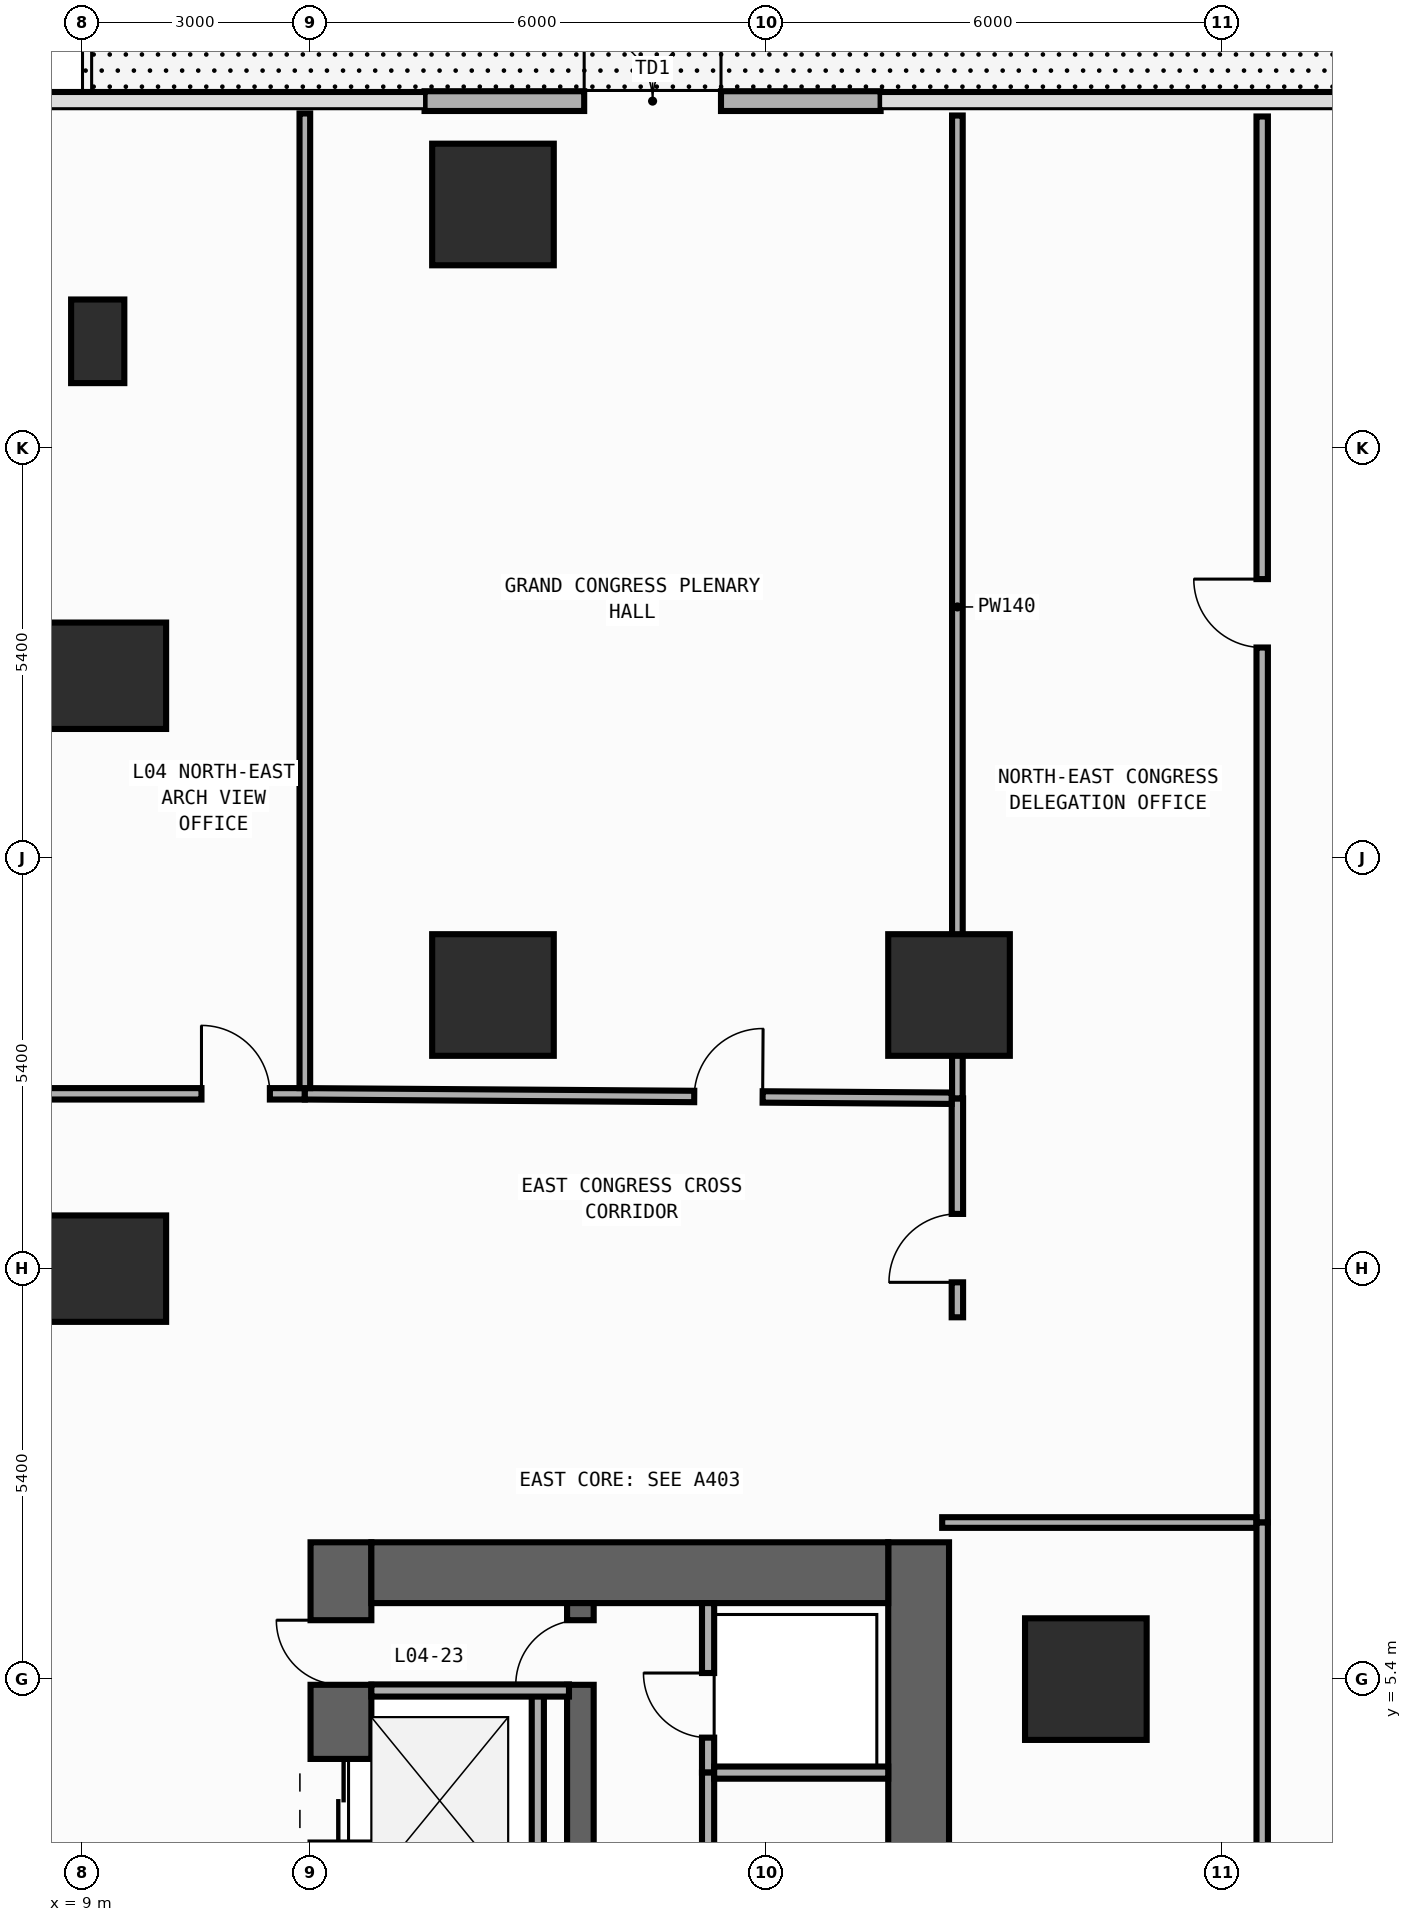
"""IFC4 building model, lengths in metres.
Left out: names, types, materials, properties, quantities, classifications, styles, units other than length and angle.
Written with IfcOpenShell. Run it as: python <this file> out.ifc"""

import sys

from ifc_helpers import new_model, si_unit, direction, frame, frame_2d, origin, origin_2d, place, context, subcontext, project, spatial, rectangle, extrude, element, fill, save


model = new_model("IFC4")
c1 = context("Model", 3, precision=1e-05, world=origin(), true_north=direction((0.0, 1.0)))
c2 = subcontext(c1, "Body", "Model", "MODEL_VIEW")
j1 = project(units=[si_unit("LENGTHUNIT", "METRE"), si_unit("PLANEANGLEUNIT", "RADIAN")], contexts=[c1])
p1 = place(None, origin())
s1 = spatial("IfcSite", under=j1, at=p1, CompositionType="ELEMENT")
p2 = place(p1, origin())
s2 = spatial("IfcBuilding", under=s1, at=p2, CompositionType="ELEMENT")
p3 = place(p2, frame((0.0, 0.0, 16.0)))
s3 = spatial("IfcBuildingStorey", under=s2, at=p3, CompositionType="ELEMENT", Elevation=16.0)
p4 = place(p3, frame((12.4, -19.8, 0.0), z_axis=(0.0, 0.0, 1.0), x_axis=(0.0, 1.0, 0.0)))
e1 = element("IfcWall", 1, at=p4, inside=s3, PredefinedType="SHEAR", context=c2, shape_type="SweptSolid", body=[
    extrude(rectangle(XDim=27.0, YDim=0.8, at=frame_2d((13.5, 0.0))), origin(), (0.0, 0.0, 1.0), 4.55),
])
p5 = place(p4, frame((23.05, 0.0, 0.0)))
e2 = element("IfcOpeningElement", 2, at=p5, cuts=e1, PredefinedType="OPENING", context=c2, shape_type="SweptSolid", body=[
    extrude(rectangle(XDim=1.1, YDim=2.2, at=frame_2d((0.55, 1.1))), frame((0.0, 0.41, 0.0), z_axis=(0.0, -1.0, 0.0), x_axis=(1.0, 0.0, 0.0)), (0.0, 0.0, 1.0), 0.82),
])
p6 = place(p4, frame((19.85, 0.0, 0.0)))
e3 = element("IfcOpeningElement", 3, at=p6, cuts=e1, PredefinedType="OPENING", context=c2, shape_type="SweptSolid", body=[
    extrude(rectangle(XDim=1.1, YDim=2.2, at=frame_2d((0.55, 1.1))), frame((0.0, 0.41, 0.0), z_axis=(0.0, -1.0, 0.0), x_axis=(1.0, 0.0, 0.0)), (0.0, 0.0, 1.0), 0.82),
])
p7 = place(p4, frame((16.65, 0.0, 0.0)))
e4 = element("IfcOpeningElement", 4, at=p7, cuts=e1, PredefinedType="OPENING", context=c2, shape_type="SweptSolid", body=[
    extrude(rectangle(XDim=1.1, YDim=2.2, at=frame_2d((0.55, 1.1))), frame((0.0, 0.41, 0.0), z_axis=(0.0, -1.0, 0.0), x_axis=(1.0, 0.0, 0.0)), (0.0, 0.0, 1.0), 0.82),
])
p8 = place(p4, frame((7.175, 0.0, 0.0)))
e5 = element("IfcOpeningElement", 5, at=p8, cuts=e1, PredefinedType="OPENING", context=c2, shape_type="SweptSolid", body=[
    extrude(rectangle(XDim=0.85, YDim=2.1, at=frame_2d((0.425, 1.05))), frame((0.0, 0.41, 0.0), z_axis=(0.0, -1.0, 0.0), x_axis=(1.0, 0.0, 0.0)), (0.0, 0.0, 1.0), 0.82),
])
p9 = place(p4, frame((10.375, 0.0, 0.0)))
e6 = element("IfcOpeningElement", 6, at=p9, cuts=e1, PredefinedType="OPENING", context=c2, shape_type="SweptSolid", body=[
    extrude(rectangle(XDim=0.85, YDim=2.1, at=frame_2d((0.425, 1.05))), frame((0.0, 0.41, 0.0), z_axis=(0.0, -1.0, 0.0), x_axis=(1.0, 0.0, 0.0)), (0.0, 0.0, 1.0), 0.82),
])
p10 = place(p4, frame((12.725, 0.0, 0.0)))
e7 = element("IfcOpeningElement", 7, at=p10, cuts=e1, PredefinedType="OPENING", context=c2, shape_type="SweptSolid", body=[
    extrude(rectangle(XDim=1.15, YDim=2.2, at=frame_2d((0.575, 1.1))), frame((0.0, 0.41, 0.0), z_axis=(0.0, -1.0, 0.0), x_axis=(1.0, 0.0, 0.0)), (0.0, 0.0, 1.0), 0.82),
])
p11 = place(p4, frame((25.125, 0.0, 0.0)))
e8 = element("IfcOpeningElement", 8, at=p11, cuts=e1, PredefinedType="OPENING", context=c2, shape_type="SweptSolid", body=[
    extrude(rectangle(XDim=0.85, YDim=2.1, at=frame_2d((0.425, 1.05))), frame((0.0, 0.41, 0.0), z_axis=(0.0, -1.0, 0.0), x_axis=(1.0, 0.0, 0.0)), (0.0, 0.0, 1.0), 0.82),
])
p12 = place(p3, frame((20.0, -19.8, 0.0), z_axis=(0.0, 0.0, 1.0), x_axis=(0.0, 1.0, 0.0)))
e9 = element("IfcWall", 9, at=p12, inside=s3, PredefinedType="SHEAR", context=c2, shape_type="SweptSolid", body=[
    extrude(rectangle(XDim=27.0, YDim=0.8, at=frame_2d((13.5, 0.0))), origin(), (0.0, 0.0, 1.0), 4.55),
])
p13 = place(p3, frame((12.8, 6.8, 0.0), z_axis=(0.0, 0.0, 1.0), x_axis=(1.0, 0.0, 0.0)))
e10 = element("IfcWall", 10, at=p13, inside=s3, PredefinedType="SHEAR", context=c2, shape_type="SweptSolid", body=[
    extrude(rectangle(XDim=6.8, YDim=0.8, at=frame_2d((3.4, 0.0))), origin(), (0.0, 0.0, 1.0), 4.55),
])
p14 = place(p3, frame((15.55, -19.0, 0.0), z_axis=(0.0, 0.0, 1.0), x_axis=(0.0, 1.0, 0.0)))
e11 = element("IfcWall", 11, at=p14, inside=s3, PredefinedType="SHEAR", context=c2, shape_type="SweptSolid", body=[
    extrude(rectangle(XDim=25.4, YDim=0.35, at=frame_2d((12.7, 0.0))), origin(), (0.0, 0.0, 1.0), 4.55),
])
p15 = place(p14, frame((11.925, 0.0, 0.0)))
e12 = element("IfcOpeningElement", 12, at=p15, cuts=e11, PredefinedType="OPENING", context=c2, shape_type="SweptSolid", body=[
    extrude(rectangle(XDim=1.15, YDim=2.2, at=frame_2d((0.575, 1.1))), frame((0.0, 0.185, 0.0), z_axis=(0.0, -1.0, 0.0), x_axis=(1.0, 0.0, 0.0)), (0.0, 0.0, 1.0), 0.37),
])
p16 = place(p14, frame((24.325, 0.0, 0.0)))
e13 = element("IfcOpeningElement", 13, at=p16, cuts=e11, PredefinedType="OPENING", context=c2, shape_type="SweptSolid", body=[
    extrude(rectangle(XDim=0.85, YDim=2.1, at=frame_2d((0.425, 1.05))), frame((0.0, 0.185, 0.0), z_axis=(0.0, -1.0, 0.0), x_axis=(1.0, 0.0, 0.0)), (0.0, 0.0, 1.0), 0.37),
])
for number, where, z_axis, x_axis in (
    (14, (9.2, 10.8, 0.0), (0.0, 0.0, 1.0), (1.0, 0.0, 0.0)),
    (15, (9.2, 18.6, 0.0), (0.0, 0.0, 1.0), (1.0, 0.0, 0.0)),
):
    element("IfcColumn", number, at=place(p3, frame(where, z_axis=z_axis, x_axis=x_axis)), inside=s3, PredefinedType="COLUMN", context=c2, shape_type="SweptSolid", body=[
        extrude(rectangle(XDim=1.8, YDim=1.4, at=origin_2d()), origin(), (0.0, 0.0, 1.0), 5.0),
    ])
for number, where, z_axis, x_axis in (
    (16, (20.4, 14.4, 0.0), (0.0, 0.0, 1.0), (1.0, 0.0, 0.0)),
    (17, (14.4, 14.4, 0.0), (0.0, 0.0, 1.0), (1.0, 0.0, 0.0)),
    (18, (22.2, 5.4, 0.0), (0.0, 0.0, 1.0), (1.0, 0.0, 0.0)),
    (19, (14.4, 24.8, 0.0), (0.0, 0.0, 1.0), (1.0, 0.0, 0.0)),
):
    element("IfcColumn", number, at=place(p3, frame(where, z_axis=z_axis, x_axis=x_axis)), inside=s3, PredefinedType="COLUMN", context=c2, shape_type="SweptSolid", body=[
        extrude(rectangle(XDim=1.6, YDim=1.6, at=origin_2d()), origin(), (0.0, 0.0, 1.0), 5.0),
    ])
p17 = place(p3, frame((9.2, 23.0, 0.0), z_axis=(0.0, 0.0, 1.0), x_axis=(1.0, 0.0, 0.0)))
e20 = element("IfcColumn", 20, at=p17, inside=s3, PredefinedType="PILASTER", context=c2, shape_type="SweptSolid", body=[
    extrude(rectangle(XDim=0.7, YDim=1.1, at=origin_2d()), origin(), (0.0, 0.0, 1.0), 5.0),
])
p18 = place(p3, frame((13.5, 26.16, 0.0), z_axis=(0.0, 0.0, 1.0), x_axis=(1.0, 0.0, 0.0)))
e21 = element("IfcWall", 21, at=p18, inside=s3, PredefinedType="STANDARD", context=c2, shape_type="SweptSolid", body=[
    extrude(rectangle(XDim=6.0, YDim=0.26, at=frame_2d((3.0, 0.0))), origin(), (0.0, 0.0, 1.0), 4.55),
])
p19 = place(p18, frame((2.1, 0.0, 0.0)))
e22 = element("IfcOpeningElement", 22, at=p19, cuts=e21, PredefinedType="OPENING", context=c2, shape_type="SweptSolid", body=[
    extrude(rectangle(XDim=1.8, YDim=2.3, at=frame_2d((0.9, 1.15))), frame((0.0, 0.14, 0.0), z_axis=(0.0, -1.0, 0.0), x_axis=(1.0, 0.0, 0.0)), (0.0, 0.0, 1.0), 0.28),
])
p20 = place(p3, frame((14.99, 2.4, 0.0), z_axis=(0.0, 0.0, 1.0), x_axis=(0.0, 1.0, 0.0)))
e23 = element("IfcWall", 23, at=p20, inside=s3, PredefinedType="STANDARD", context=c2, shape_type="SweptSolid", body=[
    extrude(rectangle(XDim=2.8, YDim=0.16, at=frame_2d((1.4, 0.0))), origin(), (0.0, 0.0, 1.0), 4.55),
])
p21 = place(p3, frame((12.8, 5.25, 0.0), z_axis=(0.0, 0.0, 1.0), x_axis=(1.0, 0.0, 0.0)))
e24 = element("IfcWall", 24, at=p21, inside=s3, PredefinedType="STANDARD", context=c2, shape_type="SweptSolid", body=[
    extrude(rectangle(XDim=2.6, YDim=0.16, at=frame_2d((1.3, 0.0))), origin(), (0.0, 0.0, 1.0), 4.55),
])
p22 = place(p3, frame((17.23, 4.17, 0.0), z_axis=(0.0, 0.0, 1.0), x_axis=(0.0, 1.0, 0.0)))
e25 = element("IfcWall", 25, at=p22, inside=s3, PredefinedType="PARTITIONING", context=c2, shape_type="SweptSolid", body=[
    extrude(rectangle(XDim=2.23, YDim=0.16, at=frame_2d((1.115, 0.0))), origin(), (0.0, 0.0, 1.0), 4.55),
])
p23 = place(p22, frame((0.46, 0.0, 0.0)))
e26 = element("IfcOpeningElement", 26, at=p23, cuts=e25, PredefinedType="OPENING", context=c2, shape_type="SweptSolid", body=[
    extrude(rectangle(XDim=0.85, YDim=2.1, at=frame_2d((0.425, 1.05))), frame((0.0, 0.09, 0.0), z_axis=(0.0, -1.0, 0.0), x_axis=(1.0, 0.0, 0.0)), (0.0, 0.0, 1.0), 0.18),
])
p24 = place(p3, frame((17.23, 1.53, 0.0), z_axis=(0.0, 0.0, 1.0), x_axis=(0.0, 1.0, 0.0)))
e27 = element("IfcWall", 27, at=p24, inside=s3, PredefinedType="PARTITIONING", context=c2, shape_type="SweptSolid", body=[
    extrude(rectangle(XDim=2.64, YDim=0.16, at=frame_2d((1.32, 0.0))), origin(), (0.0, 0.0, 1.0), 4.55),
])
p25 = place(p24, frame((0.677, 0.0, 0.0)))
e28 = element("IfcOpeningElement", 28, at=p25, cuts=e27, PredefinedType="OPENING", context=c2, shape_type="SweptSolid", body=[
    extrude(rectangle(XDim=0.85, YDim=2.1, at=frame_2d((0.425, 1.05))), frame((0.0, 0.09, 0.0), z_axis=(0.0, -1.0, 0.0), x_axis=(1.0, 0.0, 0.0)), (0.0, 0.0, 1.0), 0.18),
])
p26 = place(p3, frame((17.31, 4.17, 0.0), z_axis=(0.0, 0.0, 1.0), x_axis=(1.0, 0.0, 0.0)))
e29 = element("IfcWall", 29, at=p26, inside=s3, PredefinedType="PARTITIONING", context=c2, shape_type="SweptSolid", body=[
    extrude(rectangle(XDim=2.29, YDim=0.16, at=frame_2d((1.145, 0.0))), origin(), (0.0, 0.0, 1.0), 4.55),
])
p27 = place(p3, frame((24.52, 7.46, 0.0), z_axis=(0.0, 0.0, 1.0), x_axis=(0.0, 1.0, 0.0)))
e30 = element("IfcWall", 30, at=p27, inside=s3, PredefinedType="PARTITIONING", context=c2, shape_type="SweptSolid", body=[
    extrude(rectangle(XDim=18.498, YDim=0.15, at=frame_2d((9.249, 0.0))), origin(), (0.0, 0.0, 1.0), 4.55),
])
p28 = place(p27, frame((11.512, 0.0, 0.0)))
e31 = element("IfcOpeningElement", 31, at=p28, cuts=e30, PredefinedType="OPENING", context=c2, shape_type="SweptSolid", body=[
    extrude(rectangle(XDim=0.9, YDim=2.15, at=frame_2d((0.45, 1.075))), frame((0.0, 0.085, 0.0), z_axis=(0.0, -1.0, 0.0), x_axis=(1.0, 0.0, 0.0)), (0.0, 0.0, 1.0), 0.17),
])
p29 = place(p3, frame((20.51, 10.16, 0.0), z_axis=(0.0, 0.0, 1.0), x_axis=(0.0, 1.0, 0.0)))
e32 = element("IfcWall", 32, at=p29, inside=s3, PredefinedType="PARTITIONING", context=c2, shape_type="SweptSolid", body=[
    extrude(rectangle(XDim=2.88, YDim=0.15, at=frame_2d((1.44, 0.0))), origin(), (0.0, 0.0, 1.0), 4.55),
])
p30 = place(p29, frame((0.46, 0.0, 0.0)))
e33 = element("IfcOpeningElement", 33, at=p30, cuts=e32, PredefinedType="OPENING", context=c2, shape_type="SweptSolid", body=[
    extrude(rectangle(XDim=0.9, YDim=2.15, at=frame_2d((0.45, 1.075))), frame((0.0, 0.085, 0.0), z_axis=(0.0, -1.0, 0.0), x_axis=(1.0, 0.0, 0.0)), (0.0, 0.0, 1.0), 0.17),
])
p31 = place(p3, frame((20.51, 13.04, 0.0), z_axis=(0.0, 0.0, 1.0), x_axis=(0.0, 1.0, 0.0)))
e34 = element("IfcWall", 34, at=p31, inside=s3, PredefinedType="PARTITIONING", context=c2, shape_type="SweptSolid", body=[
    extrude(rectangle(XDim=12.93, YDim=0.14, at=frame_2d((6.465, 0.0))), origin(), (0.0, 0.0, 1.0), 4.55),
])
p32 = place(p3, frame((20.31, 7.46, 0.0), z_axis=(0.0, 0.0, 1.0), x_axis=(1.0, 0.0, 0.0)))
e35 = element("IfcWall", 35, at=p32, inside=s3, PredefinedType="PARTITIONING", context=c2, shape_type="SweptSolid", body=[
    extrude(rectangle(XDim=4.135, YDim=0.14, at=frame_2d((2.067, 0.0))), origin(), (0.0, 0.0, 1.0), 4.55),
])
p33 = place(p3, frame((8.205, 13.1, 0.0), z_axis=(0.0, 0.0, 1.0), x_axis=(1.0, 0.0, 0.0)))
e36 = element("IfcWall", 36, at=p33, inside=s3, PredefinedType="PARTITIONING", context=c2, shape_type="SweptSolid", body=[
    extrude(rectangle(XDim=3.72, YDim=0.15, at=frame_2d((1.86, 0.0))), origin(), (0.0, 0.0, 1.0), 4.55),
])
p34 = place(p33, frame((2.36, 0.0, 0.0)))
e37 = element("IfcOpeningElement", 37, at=p34, cuts=e36, PredefinedType="OPENING", context=c2, shape_type="SweptSolid", body=[
    extrude(rectangle(XDim=0.9, YDim=2.15, at=frame_2d((0.45, 1.075))), frame((0.0, 0.085, 0.0), z_axis=(0.0, -1.0, 0.0), x_axis=(1.0, 0.0, 0.0)), (0.0, 0.0, 1.0), 0.17),
])
p35 = place(p3, frame((24.52, -16.12, 0.0), z_axis=(0.0, 0.0, 1.0), x_axis=(0.0, 1.0, 0.0)))
e38 = element("IfcWall", 38, at=p35, inside=s3, PredefinedType="PARTITIONING", context=c2, shape_type="SweptSolid", body=[
    extrude(rectangle(XDim=23.58, YDim=0.15, at=frame_2d((11.79, 0.0))), origin(), (0.0, 0.0, 1.0), 4.55),
])
p36 = place(p35, frame((10.333, 0.0, 0.0)))
e39 = element("IfcOpeningElement", 39, at=p36, cuts=e38, PredefinedType="OPENING", context=c2, shape_type="SweptSolid", body=[
    extrude(rectangle(XDim=0.9, YDim=2.15, at=frame_2d((0.45, 1.075))), frame((0.0, 0.085, 0.0), z_axis=(0.0, -1.0, 0.0), x_axis=(1.0, 0.0, 0.0)), (0.0, 0.0, 1.0), 0.17),
])
p37 = place(p3, frame((11.925, 13.1, 0.0), z_axis=(0.0, 0.0, 1.0), x_axis=(0.999976690727, -0.006827737682, 0.0)))
e40 = element("IfcWall", 40, at=p37, inside=s3, PredefinedType="PARTITIONING", context=c2, shape_type="SweptSolid", body=[
    extrude(rectangle(XDim=8.51, YDim=0.15, at=frame_2d((4.255, 0.0))), origin(), (0.0, 0.0, 1.0), 4.55),
])
p38 = place(p37, frame((5.123, 0.0, 0.0)))
e41 = element("IfcOpeningElement", 41, at=p38, cuts=e40, PredefinedType="OPENING", context=c2, shape_type="SweptSolid", body=[
    extrude(rectangle(XDim=0.9, YDim=2.15, at=frame_2d((0.45, 1.075))), frame((0.0, 0.085, 0.0), z_axis=(0.0, -1.0, 0.0), x_axis=(1.0, 0.0, 0.0)), (0.0, 0.0, 1.0), 0.17),
])
p39 = place(p3, frame((11.925, 13.175, 0.0), z_axis=(0.0, 0.0, 1.0), x_axis=(0.0, 1.0, 0.0)))
e42 = element("IfcWall", 42, at=p39, inside=s3, PredefinedType="PARTITIONING", context=c2, shape_type="SweptSolid", body=[
    extrude(rectangle(XDim=12.823, YDim=0.14, at=frame_2d((6.411, 0.0))), origin(), (0.0, 0.0, 1.0), 4.55),
])
p40 = place(p19, origin())
e43 = element("IfcDoor", 43, at=p40, inside=s3, OperationType="DOUBLE_DOOR_SINGLE_SWING", PredefinedType="DOOR", context=c2, shape_type="SweptSolid", body=[
    extrude(rectangle(XDim=1.8, YDim=2.3, at=frame_2d((0.9, 1.15))), frame((0.0, 0.025, 0.0), z_axis=(0.0, -1.0, 0.0), x_axis=(1.0, 0.0, 0.0)), (0.0, 0.0, 1.0), 0.05),
])
fill(e22, e43)
p41 = place(p5, origin())
e44 = element("IfcDoor", 44, at=p41, inside=s3, OperationType="DOUBLE_DOOR_SLIDING", PredefinedType="DOOR", context=c2, shape_type="SweptSolid", body=[
    extrude(rectangle(XDim=1.1, YDim=2.2, at=frame_2d((0.55, 1.1))), frame((0.0, 0.025, 0.0), z_axis=(0.0, -1.0, 0.0), x_axis=(1.0, 0.0, 0.0)), (0.0, 0.0, 1.0), 0.05),
])
fill(e2, e44)
p42 = place(p11, origin())
e45 = element("IfcDoor", 45, at=p42, inside=s3, OperationType="SINGLE_SWING_RIGHT", PredefinedType="DOOR", context=c2, shape_type="SweptSolid", body=[
    extrude(rectangle(XDim=0.85, YDim=2.1, at=frame_2d((0.425, 1.05))), frame((0.0, 0.025, 0.0), z_axis=(0.0, -1.0, 0.0), x_axis=(1.0, 0.0, 0.0)), (0.0, 0.0, 1.0), 0.05),
])
fill(e8, e45)
p43 = place(p16, origin())
e46 = element("IfcDoor", 46, at=p43, inside=s3, OperationType="SINGLE_SWING_LEFT", PredefinedType="DOOR", context=c2, shape_type="SweptSolid", body=[
    extrude(rectangle(XDim=0.85, YDim=2.1, at=frame_2d((0.425, 1.05))), frame((0.0, 0.025, 0.0), z_axis=(0.0, -1.0, 0.0), x_axis=(1.0, 0.0, 0.0)), (0.0, 0.0, 1.0), 0.05),
])
fill(e13, e46)
p44 = place(p23, origin())
e47 = element("IfcDoor", 47, at=p44, inside=s3, OperationType="SINGLE_SWING_RIGHT", PredefinedType="DOOR", context=c2, shape_type="SweptSolid", body=[
    extrude(rectangle(XDim=0.85, YDim=2.1, at=frame_2d((0.425, 1.05))), frame((0.0, 0.025, 0.0), z_axis=(0.0, -1.0, 0.0), x_axis=(1.0, 0.0, 0.0)), (0.0, 0.0, 1.0), 0.05),
])
fill(e26, e47)
p45 = place(p28, origin())
e48 = element("IfcDoor", 48, at=p45, inside=s3, OperationType="SINGLE_SWING_RIGHT", PredefinedType="DOOR", context=c2, shape_type="SweptSolid", body=[
    extrude(rectangle(XDim=0.9, YDim=2.15, at=frame_2d((0.45, 1.075))), frame((0.0, 0.025, 0.0), z_axis=(0.0, -1.0, 0.0), x_axis=(1.0, 0.0, 0.0)), (0.0, 0.0, 1.0), 0.05),
])
fill(e31, e48)
p46 = place(p30, origin())
e49 = element("IfcDoor", 49, at=p46, inside=s3, OperationType="SINGLE_SWING_LEFT", PredefinedType="DOOR", context=c2, shape_type="SweptSolid", body=[
    extrude(rectangle(XDim=0.9, YDim=2.15, at=frame_2d((0.45, 1.075))), frame((0.0, 0.025, 0.0), z_axis=(0.0, -1.0, 0.0), x_axis=(1.0, 0.0, 0.0)), (0.0, 0.0, 1.0), 0.05),
])
fill(e33, e49)
p47 = place(p34, origin())
e50 = element("IfcDoor", 50, at=p47, inside=s3, OperationType="SINGLE_SWING_LEFT", PredefinedType="DOOR", context=c2, shape_type="SweptSolid", body=[
    extrude(rectangle(XDim=0.9, YDim=2.15, at=frame_2d((0.45, 1.075))), frame((0.0, 0.025, 0.0), z_axis=(0.0, -1.0, 0.0), x_axis=(1.0, 0.0, 0.0)), (0.0, 0.0, 1.0), 0.05),
])
fill(e37, e50)
p48 = place(p38, origin())
e51 = element("IfcDoor", 51, at=p48, inside=s3, OperationType="SINGLE_SWING_RIGHT", PredefinedType="DOOR", context=c2, shape_type="SweptSolid", body=[
    extrude(rectangle(XDim=0.9, YDim=2.15, at=frame_2d((0.45, 1.075))), frame((0.0, 0.025, 0.0), z_axis=(0.0, -1.0, 0.0), x_axis=(1.0, 0.0, 0.0)), (0.0, 0.0, 1.0), 0.05),
])
fill(e41, e51)
save(model, sys.argv[1])
